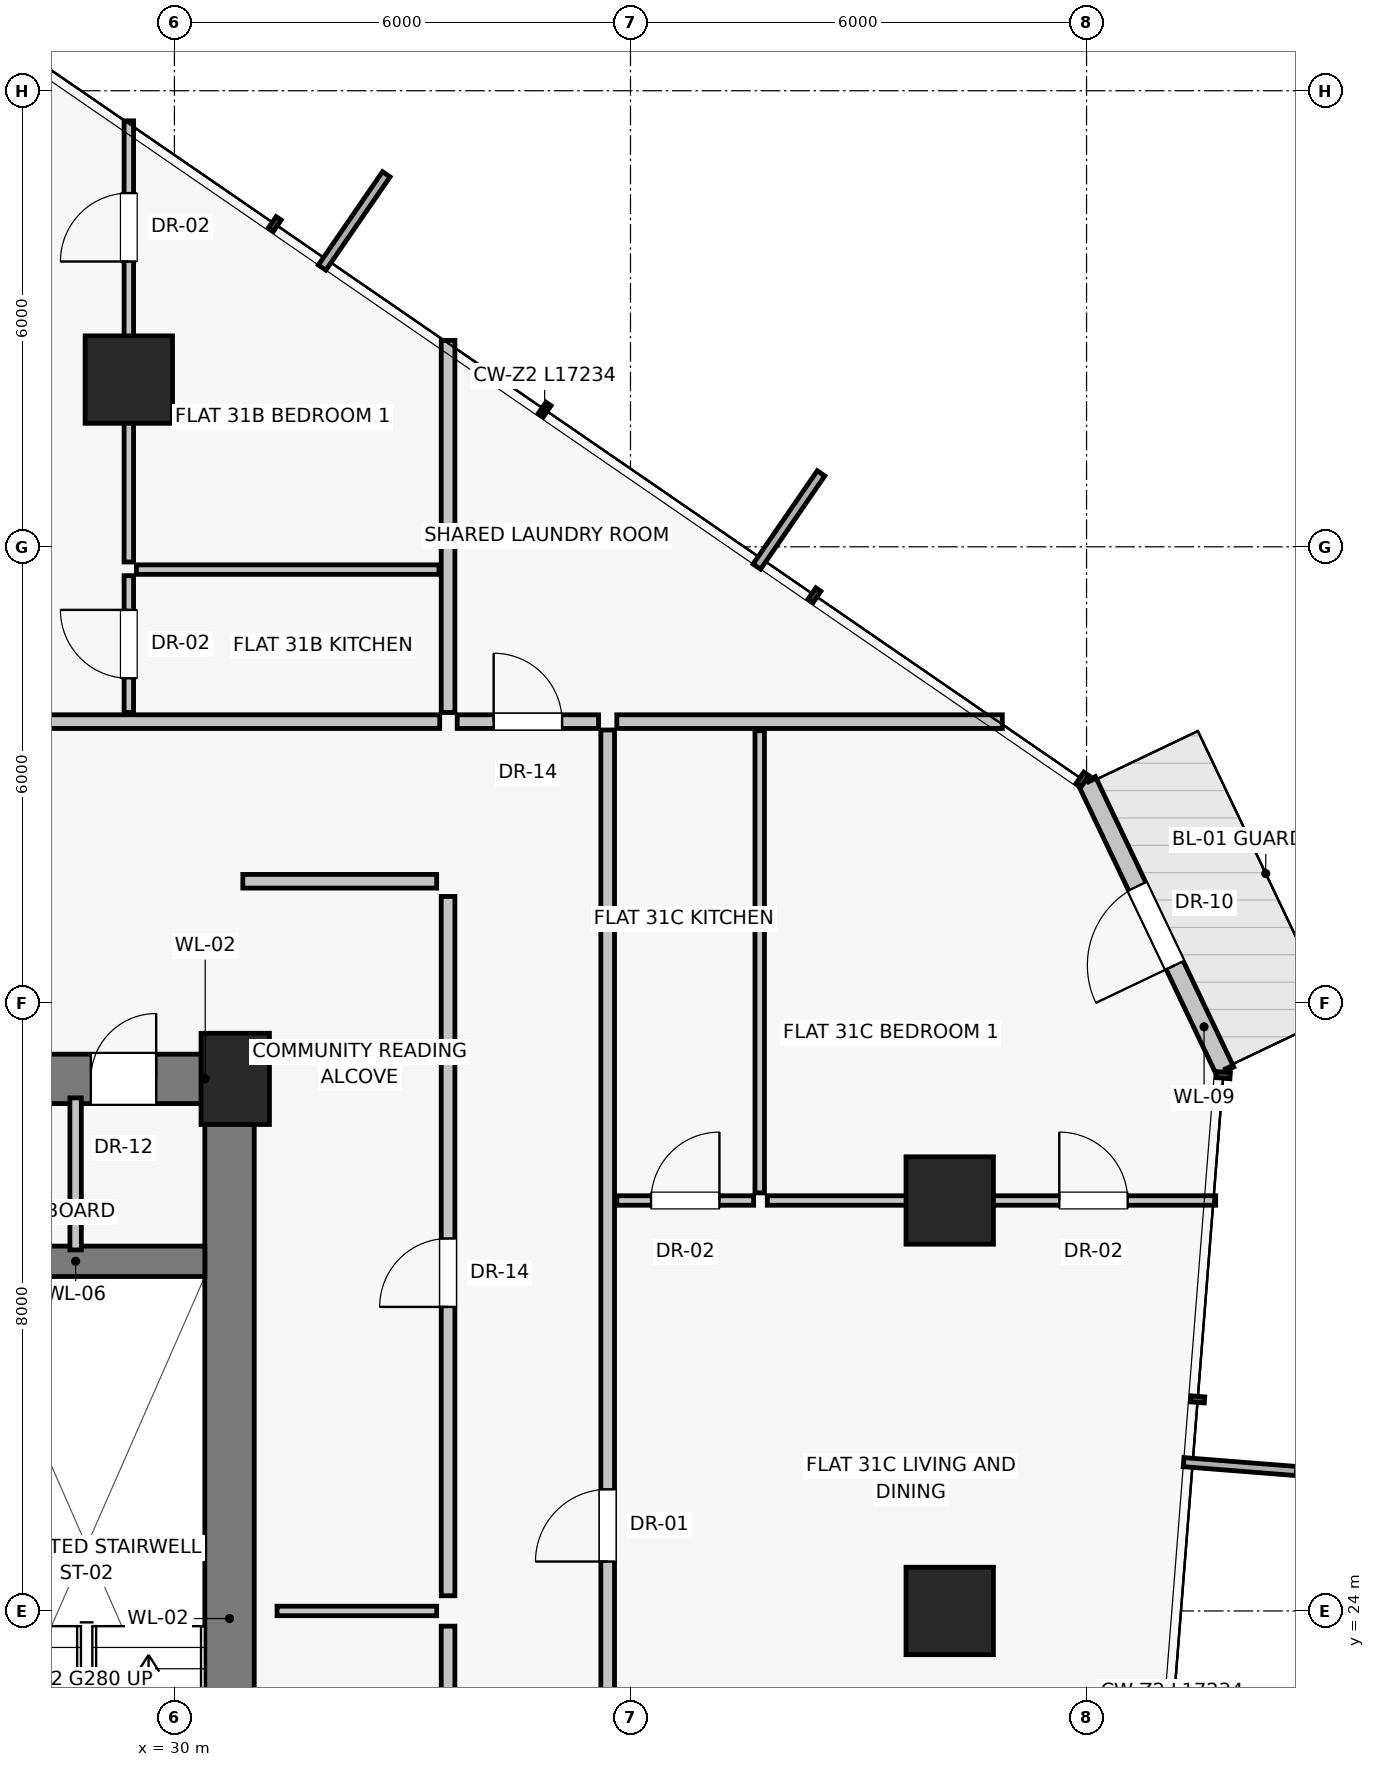
"""IFC4 building model, lengths in metres.
Left out: names, types, materials, properties, quantities, classifications, styles, units other than length and angle.
Written with IfcOpenShell. Run it as: python <this file> out.ifc"""

import sys

from ifc_helpers import new_model, si_unit, direction, frame, frame_2d, origin, origin_2d, place, context, subcontext, project, spatial, rectangle, extrude, source, transform, mapped, element, fill, save


model = new_model("IFC4")
c1 = context("Model", 3, precision=1e-05, world=origin(), true_north=direction((0.0, 1.0)))
c2 = subcontext(c1, "Body", "Model", "MODEL_VIEW")
j1 = project(units=[si_unit("LENGTHUNIT", "METRE"), si_unit("PLANEANGLEUNIT", "RADIAN")], contexts=[c1])
p1 = place(None, origin())
s1 = spatial("IfcSite", under=j1, at=p1, CompositionType="ELEMENT")
p2 = place(p1, origin())
s2 = spatial("IfcBuilding", under=s1, at=p2, CompositionType="ELEMENT")
p3 = place(p2, frame((0.0, 0.0, 113.25)))
s3 = spatial("IfcBuildingStorey", under=s2, at=p3, CompositionType="ELEMENT", Elevation=113.25)
p4 = place(p3, frame((30.8, 31.0, 0.0), z_axis=(0.0, 0.0, 1.0), x_axis=(1.0, 0.0, 0.0)))
e1 = element("IfcColumn", 1, at=p4, inside=s3, PredefinedType="PILASTER", context=c2, shape_type="SweptSolid", body=[
    extrude(rectangle(XDim=0.9, YDim=1.2, at=origin_2d()), origin(), (0.0, 0.0, 1.0), 3.25),
])
for number, where, z_axis, x_axis in (
    (2, (40.2, 24.0, 0.0), (0.0, 0.0, 1.0), (1.0, 0.0, 0.0)),
    (3, (40.2, 29.4, 0.0), (0.0, 0.0, 1.0), (1.0, 0.0, 0.0)),
    (4, (29.4, 40.2, 0.0), (0.0, 0.0, 1.0), (1.0, 0.0, 0.0)),
):
    element("IfcColumn", number, at=place(p3, frame(where, z_axis=z_axis, x_axis=x_axis)), inside=s3, PredefinedType="COLUMN", context=c2, shape_type="SweptSolid", body=[
        extrude(rectangle(XDim=1.15, YDim=1.15, at=origin_2d()), origin(), (0.0, 0.0, 1.0), 3.25),
    ])
p5 = place(p3, frame((43.824, 31.102, 0.0), z_axis=(0.0, 0.0, 1.0), x_axis=(-0.430177579223, 0.902744288453, 0.0)))
e5 = element("IfcWall", 5, at=p5, inside=s3, PredefinedType="SOLIDWALL", context=c2, shape_type="SweptSolid", body=[
    extrude(rectangle(XDim=4.233, YDim=0.25, at=frame_2d((2.117, 0.0))), origin(), (0.0, 0.0, 1.0), 3.0),
])
p6 = place(p5, frame((1.542, 0.0, 0.0)))
e6 = element("IfcOpeningElement", 6, at=p6, cuts=e5, PredefinedType="OPENING", context=c2, shape_type="SweptSolid", body=[
    extrude(rectangle(XDim=1.15, YDim=2.25, at=frame_2d((0.575, 1.125))), frame((0.0, 0.135, 0.0), z_axis=(0.0, -1.0, 0.0), x_axis=(1.0, 0.0, 0.0)), (0.0, 0.0, 1.0), 0.27),
])
p7 = place(p3, frame((30.725, 16.8, 0.0), z_axis=(0.0, 0.0, 1.0), x_axis=(0.0, 1.0, 0.0)))
e7 = element("IfcWall", 7, at=p7, inside=s3, PredefinedType="SHEAR", context=c2, shape_type="SweptSolid", body=[
    extrude(rectangle(XDim=14.2, YDim=0.65, at=frame_2d((7.1, 0.0))), origin(), (0.0, 0.0, 1.0), 3.0),
])
p8 = place(p3, frame((27.0, 31.0, 0.0), z_axis=(0.0, 0.0, 1.0), x_axis=(1.0, 0.0, 0.0)))
e8 = element("IfcWall", 8, at=p8, inside=s3, PredefinedType="SHEAR", context=c2, shape_type="SweptSolid", body=[
    extrude(rectangle(XDim=3.8, YDim=0.65, at=frame_2d((1.9, 0.0))), origin(), (0.0, 0.0, 1.0), 3.0),
])
p9 = place(p8, frame((0.45, 0.0, 0.0)))
e9 = element("IfcOpeningElement", 9, at=p9, cuts=e8, PredefinedType="OPENING", context=c2, shape_type="SweptSolid", body=[
    extrude(rectangle(XDim=0.86, YDim=2.01, at=frame_2d((0.43, 1.005))), frame((0.0, 0.335, 0.0), z_axis=(0.0, -1.0, 0.0), x_axis=(1.0, 0.0, 0.0)), (0.0, 0.0, 1.0), 0.67),
])
p10 = place(p8, frame((1.9, 0.0, 0.0)))
e10 = element("IfcOpeningElement", 10, at=p10, cuts=e8, PredefinedType="OPENING", context=c2, shape_type="SweptSolid", body=[
    extrude(rectangle(XDim=0.86, YDim=2.01, at=frame_2d((0.43, 1.005))), frame((0.0, 0.335, 0.0), z_axis=(0.0, -1.0, 0.0), x_axis=(1.0, 0.0, 0.0)), (0.0, 0.0, 1.0), 0.67),
])
p11 = place(p3, frame((27.0, 28.6, 0.0), z_axis=(0.0, 0.0, 1.0), x_axis=(1.0, 0.0, 0.0)))
e11 = element("IfcWall", 11, at=p11, inside=s3, PredefinedType="SHEAR", context=c2, shape_type="SweptSolid", body=[
    extrude(rectangle(XDim=3.4, YDim=0.4, at=frame_2d((1.7, 0.0))), origin(), (0.0, 0.0, 1.0), 3.0),
])
p12 = place(p3, frame((28.7, 28.75, 0.0), z_axis=(0.0, 0.0, 1.0), x_axis=(0.0, 1.0, 0.0)))
e12 = element("IfcWall", 12, at=p12, inside=s3, PredefinedType="PARTITIONING", context=c2, shape_type="SweptSolid", body=[
    extrude(rectangle(XDim=2.0, YDim=0.15, at=frame_2d((1.0, 0.0))), origin(), (0.0, 0.0, 1.0), 3.0),
])
p13 = place(p3, frame((33.6, 14.4, 0.0), z_axis=(0.0, 0.0, 1.0), x_axis=(0.0, 1.0, 0.0)))
e13 = element("IfcWall", 13, at=p13, inside=s3, PredefinedType="PARTITIONING", context=c2, shape_type="SweptSolid", body=[
    extrude(rectangle(XDim=9.4, YDim=0.18, at=frame_2d((4.7, 0.0))), origin(), (0.0, 0.0, 1.0), 3.0),
])
p14 = place(p13, frame((3.8, 0.0, 0.0)))
e14 = element("IfcOpeningElement", 14, at=p14, cuts=e13, PredefinedType="OPENING", context=c2, shape_type="SweptSolid", body=[
    extrude(rectangle(XDim=0.9, YDim=2.01, at=frame_2d((0.45, 1.005))), frame((0.0, 0.1, 0.0), z_axis=(0.0, -1.0, 0.0), x_axis=(1.0, 0.0, 0.0)), (0.0, 0.0, 1.0), 0.2),
])
p15 = place(p3, frame((33.6, 24.2, 0.0), z_axis=(0.0, 0.0, 1.0), x_axis=(0.0, 1.0, 0.0)))
e15 = element("IfcWall", 15, at=p15, inside=s3, PredefinedType="PARTITIONING", context=c2, shape_type="SweptSolid", body=[
    extrude(rectangle(XDim=9.2, YDim=0.18, at=frame_2d((4.6, 0.0))), origin(), (0.0, 0.0, 1.0), 3.0),
])
p16 = place(p15, frame((3.8, 0.0, 0.0)))
e16 = element("IfcOpeningElement", 16, at=p16, cuts=e15, PredefinedType="OPENING", context=c2, shape_type="SweptSolid", body=[
    extrude(rectangle(XDim=0.9, YDim=2.01, at=frame_2d((0.45, 1.005))), frame((0.0, 0.1, 0.0), z_axis=(0.0, -1.0, 0.0), x_axis=(1.0, 0.0, 0.0)), (0.0, 0.0, 1.0), 0.2),
])
p17 = place(p3, frame((31.35, 24.0, 0.0), z_axis=(0.0, 0.0, 1.0), x_axis=(1.0, 0.0, 0.0)))
e17 = element("IfcWall", 17, at=p17, inside=s3, PredefinedType="PARTITIONING", context=c2, shape_type="SweptSolid", body=[
    extrude(rectangle(XDim=2.1, YDim=0.125, at=frame_2d((1.05, 0.0))), origin(), (0.0, 0.0, 1.0), 3.0),
])
p18 = place(p3, frame((30.9, 33.6, 0.0), z_axis=(0.0, 0.0, 1.0), x_axis=(1.0, 0.0, 0.0)))
e18 = element("IfcWall", 18, at=p18, inside=s3, PredefinedType="PARTITIONING", context=c2, shape_type="SweptSolid", body=[
    extrude(rectangle(XDim=2.55, YDim=0.18, at=frame_2d((1.275, 0.0))), origin(), (0.0, 0.0, 1.0), 3.0),
])
p19 = place(p3, frame((33.6, 35.82, 0.0), z_axis=(0.0, 0.0, 1.0), x_axis=(0.0, 1.0, 0.0)))
e19 = element("IfcWall", 19, at=p19, inside=s3, PredefinedType="PARTITIONING", context=c2, shape_type="SweptSolid", body=[
    extrude(rectangle(XDim=4.895, YDim=0.18, at=frame_2d((2.448, 0.0))), origin(), (0.0, 0.0, 1.0), 3.0),
])
p20 = place(p3, frame((18.71, 35.7, 0.0), z_axis=(0.0, 0.0, 1.0), x_axis=(1.0, 0.0, 0.0)))
e20 = element("IfcWall", 20, at=p20, inside=s3, PredefinedType="PARTITIONING", context=c2, shape_type="SweptSolid", body=[
    extrude(rectangle(XDim=14.78, YDim=0.18, at=frame_2d((7.39, 0.0))), origin(), (0.0, 0.0, 1.0), 2.58),
])
p21 = place(p20, frame((5.94, 0.0, 0.0)))
e21 = element("IfcOpeningElement", 21, at=p21, cuts=e20, PredefinedType="OPENING", context=c2, shape_type="SweptSolid", body=[
    extrude(rectangle(XDim=0.95, YDim=2.02, at=frame_2d((0.475, 1.01))), frame((0.0, 0.1, 0.0), z_axis=(0.0, -1.0, 0.0), x_axis=(1.0, 0.0, 0.0)), (0.0, 0.0, 1.0), 0.2),
])
p22 = place(p3, frame((29.4, 35.82, 0.0), z_axis=(0.0, 0.0, 1.0), x_axis=(0.0, 1.0, 0.0)))
e22 = element("IfcWall", 22, at=p22, inside=s3, PredefinedType="PARTITIONING", context=c2, shape_type="SweptSolid", body=[
    extrude(rectangle(XDim=1.8, YDim=0.125, at=frame_2d((0.9, 0.0))), origin(), (0.0, 0.0, 1.0), 2.378),
])
p23 = place(p22, frame((0.45, 0.0, 0.0)))
e23 = element("IfcOpeningElement", 23, at=p23, cuts=e22, PredefinedType="OPENING", context=c2, shape_type="SweptSolid", body=[
    extrude(rectangle(XDim=0.9, YDim=2.01, at=frame_2d((0.45, 1.005))), frame((0.0, 0.073, 0.0), z_axis=(0.0, -1.0, 0.0), x_axis=(1.0, 0.0, 0.0)), (0.0, 0.0, 1.0), 0.145),
])
p24 = place(p3, frame((29.5, 37.7, 0.0), z_axis=(0.0, 0.0, 1.0), x_axis=(1.0, 0.0, 0.0)))
e24 = element("IfcWall", 24, at=p24, inside=s3, PredefinedType="PARTITIONING", context=c2, shape_type="SweptSolid", body=[
    extrude(rectangle(XDim=3.98, YDim=0.125, at=frame_2d((1.99, 0.0))), origin(), (0.0, 0.0, 1.0), 3.0),
])
p25 = place(p3, frame((29.4, 37.8, 0.0), z_axis=(0.0, 0.0, 1.0), x_axis=(0.0, 1.0, 0.0)))
e25 = element("IfcWall", 25, at=p25, inside=s3, PredefinedType="PARTITIONING", context=c2, shape_type="SweptSolid", body=[
    extrude(rectangle(XDim=5.804, YDim=0.125, at=frame_2d((2.902, 0.0))), origin(), (0.0, 0.0, 1.0), 2.378),
])
p26 = place(p25, frame((3.953, 0.0, 0.0)))
e26 = element("IfcOpeningElement", 26, at=p26, cuts=e25, PredefinedType="OPENING", context=c2, shape_type="SweptSolid", body=[
    extrude(rectangle(XDim=0.9, YDim=2.01, at=frame_2d((0.45, 1.005))), frame((0.0, 0.073, 0.0), z_axis=(0.0, -1.0, 0.0), x_axis=(1.0, 0.0, 0.0)), (0.0, 0.0, 1.0), 0.145),
])
p27 = place(p3, frame((35.82, 35.7, 0.0), z_axis=(0.0, 0.0, 1.0), x_axis=(1.0, 0.0, 0.0)))
e27 = element("IfcWall", 27, at=p27, inside=s3, PredefinedType="PARTITIONING", context=c2, shape_type="SweptSolid", body=[
    extrude(rectangle(XDim=5.072, YDim=0.18, at=frame_2d((2.536, 0.0))), origin(), (0.0, 0.0, 1.0), 3.0),
])
p28 = place(p3, frame((35.7, 18.71, 0.0), z_axis=(0.0, 0.0, 1.0), x_axis=(0.0, 1.0, 0.0)))
e28 = element("IfcWall", 28, at=p28, inside=s3, PredefinedType="PARTITIONING", context=c2, shape_type="SweptSolid", body=[
    extrude(rectangle(XDim=16.88, YDim=0.18, at=frame_2d((8.44, 0.0))), origin(), (0.0, 0.0, 1.0), 2.58),
])
p29 = place(p28, frame((5.94, 0.0, 0.0)))
e29 = element("IfcOpeningElement", 29, at=p29, cuts=e28, PredefinedType="OPENING", context=c2, shape_type="SweptSolid", body=[
    extrude(rectangle(XDim=0.95, YDim=2.02, at=frame_2d((0.475, 1.01))), frame((0.0, 0.1, 0.0), z_axis=(0.0, -1.0, 0.0), x_axis=(1.0, 0.0, 0.0)), (0.0, 0.0, 1.0), 0.2),
])
p30 = place(p3, frame((35.82, 29.4, 0.0), z_axis=(0.0, 0.0, 1.0), x_axis=(1.0, 0.0, 0.0)))
e30 = element("IfcWall", 30, at=p30, inside=s3, PredefinedType="PARTITIONING", context=c2, shape_type="SweptSolid", body=[
    extrude(rectangle(XDim=1.8, YDim=0.125, at=frame_2d((0.9, 0.0))), origin(), (0.0, 0.0, 1.0), 2.378),
])
p31 = place(p30, frame((0.45, 0.0, 0.0)))
e31 = element("IfcOpeningElement", 31, at=p31, cuts=e30, PredefinedType="OPENING", context=c2, shape_type="SweptSolid", body=[
    extrude(rectangle(XDim=0.9, YDim=2.01, at=frame_2d((0.45, 1.005))), frame((0.0, 0.073, 0.0), z_axis=(0.0, -1.0, 0.0), x_axis=(1.0, 0.0, 0.0)), (0.0, 0.0, 1.0), 0.145),
])
p32 = place(p3, frame((37.7, 29.5, 0.0), z_axis=(0.0, 0.0, 1.0), x_axis=(0.0, 1.0, 0.0)))
e32 = element("IfcWall", 32, at=p32, inside=s3, PredefinedType="PARTITIONING", context=c2, shape_type="SweptSolid", body=[
    extrude(rectangle(XDim=6.08, YDim=0.125, at=frame_2d((3.04, 0.0))), origin(), (0.0, 0.0, 1.0), 3.0),
])
p33 = place(p3, frame((37.8, 29.4, 0.0), z_axis=(0.0, 0.0, 1.0), x_axis=(1.0, 0.0, 0.0)))
e33 = element("IfcWall", 33, at=p33, inside=s3, PredefinedType="PARTITIONING", context=c2, shape_type="SweptSolid", body=[
    extrude(rectangle(XDim=5.899, YDim=0.125, at=frame_2d((2.95, 0.0))), origin(), (0.0, 0.0, 1.0), 2.378),
])
p34 = place(p33, frame((3.841, 0.0, 0.0)))
e34 = element("IfcOpeningElement", 34, at=p34, cuts=e33, PredefinedType="OPENING", context=c2, shape_type="SweptSolid", body=[
    extrude(rectangle(XDim=0.9, YDim=2.01, at=frame_2d((0.45, 1.005))), frame((0.0, 0.073, 0.0), z_axis=(0.0, -1.0, 0.0), x_axis=(1.0, 0.0, 0.0)), (0.0, 0.0, 1.0), 0.145),
])
p35 = place(p3, frame((33.72, 35.7, 0.0), z_axis=(0.0, 0.0, 1.0), x_axis=(1.0, 0.0, 0.0)))
e35 = element("IfcWall", 35, at=p35, inside=s3, PredefinedType="PARTITIONING", context=c2, shape_type="SweptSolid", body=[
    extrude(rectangle(XDim=1.86, YDim=0.18, at=frame_2d((0.93, 0.0))), origin(), (0.0, 0.0, 1.0), 3.0),
])
p36 = place(p35, frame((0.48, 0.0, 0.0)))
e36 = element("IfcOpeningElement", 36, at=p36, cuts=e35, PredefinedType="OPENING", context=c2, shape_type="SweptSolid", body=[
    extrude(rectangle(XDim=0.9, YDim=2.01, at=frame_2d((0.45, 1.005))), frame((0.0, 0.1, 0.0), z_axis=(0.0, -1.0, 0.0), x_axis=(1.0, 0.0, 0.0)), (0.0, 0.0, 1.0), 0.2),
])
m1 = source(origin(), c2, "Body", "SweptSolid", [
    extrude(rectangle(XDim=1.15, YDim=2.25, at=frame_2d((0.575, 1.125))), frame((0.0, 0.025, 0.0), z_axis=(0.0, -1.0, 0.0), x_axis=(1.0, 0.0, 0.0)), (0.0, 0.0, 1.0), 0.05),
])
p37 = place(p6, frame((1.15, 0.0, 0.0), z_axis=(0.0, 0.0, 1.0), x_axis=(-1.0, 0.0, 0.0)))
e37 = element("IfcDoor", 37, at=p37, inside=s3, OperationType="SINGLE_SWING_LEFT", PredefinedType="DOOR", context=c2, shape_type="MappedRepresentation", body=[
    mapped(m1, transform((0.0, 0.0, 0.0), scale=1.0)),
])
fill(e6, e37)
m2 = source(origin(), c2, "Body", "SweptSolid", [
    extrude(rectangle(XDim=0.86, YDim=2.01, at=frame_2d((0.43, 1.005))), frame((0.0, 0.025, 0.0), z_axis=(0.0, -1.0, 0.0), x_axis=(1.0, 0.0, 0.0)), (0.0, 0.0, 1.0), 0.05),
])
p38 = place(p10, origin())
e38 = element("IfcDoor", 38, at=p38, inside=s3, OperationType="SINGLE_SWING_RIGHT", PredefinedType="DOOR", context=c2, shape_type="MappedRepresentation", body=[
    mapped(m2, transform((0.0, 0.0, 0.0), scale=1.0)),
])
fill(e10, e38)
m3 = source(origin(), c2, "Body", "SweptSolid", [
    extrude(rectangle(XDim=0.9, YDim=2.01, at=frame_2d((0.45, 1.005))), frame((0.0, 0.025, 0.0), z_axis=(0.0, -1.0, 0.0), x_axis=(1.0, 0.0, 0.0)), (0.0, 0.0, 1.0), 0.05),
])
p39 = place(p16, origin())
e39 = element("IfcDoor", 39, at=p39, inside=s3, OperationType="SINGLE_SWING_LEFT", PredefinedType="DOOR", context=c2, shape_type="MappedRepresentation", body=[
    mapped(m3, transform((0.0, 0.0, 0.0), scale=1.0)),
])
fill(e16, e39)
p40 = place(p23, origin())
e40 = element("IfcDoor", 40, at=p40, inside=s3, OperationType="SINGLE_SWING_RIGHT", PredefinedType="DOOR", context=c2, shape_type="MappedRepresentation", body=[
    mapped(m3, transform((0.0, 0.0, 0.0), scale=1.0)),
])
fill(e23, e40)
p41 = place(p26, origin())
e41 = element("IfcDoor", 41, at=p41, inside=s3, OperationType="SINGLE_SWING_LEFT", PredefinedType="DOOR", context=c2, shape_type="MappedRepresentation", body=[
    mapped(m3, transform((0.0, 0.0, 0.0), scale=1.0)),
])
fill(e26, e41)
m4 = source(origin(), c2, "Body", "SweptSolid", [
    extrude(rectangle(XDim=0.95, YDim=2.02, at=frame_2d((0.475, 1.01))), frame((0.0, 0.025, 0.0), z_axis=(0.0, -1.0, 0.0), x_axis=(1.0, 0.0, 0.0)), (0.0, 0.0, 1.0), 0.05),
])
p42 = place(p29, origin())
e42 = element("IfcDoor", 42, at=p42, inside=s3, OperationType="SINGLE_SWING_LEFT", PredefinedType="DOOR", context=c2, shape_type="MappedRepresentation", body=[
    mapped(m4, transform((0.0, 0.0, 0.0), scale=1.0)),
])
fill(e29, e42)
p43 = place(p31, origin())
e43 = element("IfcDoor", 43, at=p43, inside=s3, OperationType="SINGLE_SWING_RIGHT", PredefinedType="DOOR", context=c2, shape_type="MappedRepresentation", body=[
    mapped(m3, transform((0.0, 0.0, 0.0), scale=1.0)),
])
fill(e31, e43)
p44 = place(p34, origin())
e44 = element("IfcDoor", 44, at=p44, inside=s3, OperationType="SINGLE_SWING_LEFT", PredefinedType="DOOR", context=c2, shape_type="MappedRepresentation", body=[
    mapped(m3, transform((0.0, 0.0, 0.0), scale=1.0)),
])
fill(e34, e44)
p45 = place(p36, origin())
e45 = element("IfcDoor", 45, at=p45, inside=s3, OperationType="SINGLE_SWING_LEFT", PredefinedType="DOOR", context=c2, shape_type="MappedRepresentation", body=[
    mapped(m3, transform((0.0, 0.0, 0.0), scale=1.0)),
])
fill(e36, e45)
save(model, sys.argv[1])
